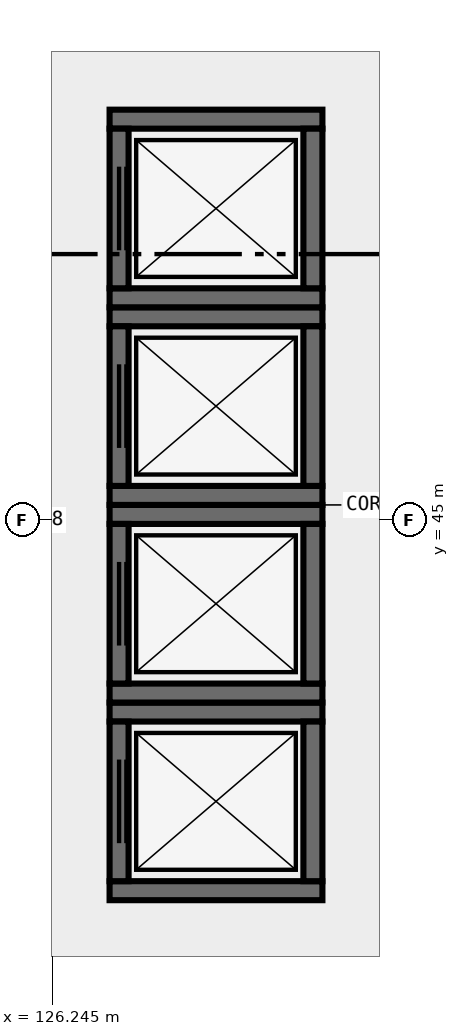
"""IFC4 building model, lengths in metres.
Left out: names, types, materials, properties, quantities, classifications, styles, units other than length and angle.
Written with IfcOpenShell. Run it as: python <this file> out.ifc"""

import sys

from ifc_helpers import new_model, si_unit, direction, frame, frame_2d, origin, place, context, subcontext, project, spatial, rectangle, extrude, element, fill, save


model = new_model("IFC4")
c1 = context("Model", 3, precision=1e-05, world=origin(), true_north=direction((0.0, 1.0)))
c2 = subcontext(c1, "Body", "Model", "MODEL_VIEW")
j1 = project(units=[si_unit("LENGTHUNIT", "METRE"), si_unit("PLANEANGLEUNIT", "RADIAN")], contexts=[c1])
p1 = place(None, origin())
s1 = spatial("IfcSite", under=j1, at=p1, CompositionType="ELEMENT")
p2 = place(p1, origin())
s2 = spatial("IfcBuilding", under=s1, at=p2, CompositionType="ELEMENT")
p3 = place(p2, origin())
s3 = spatial("IfcBuildingStorey", under=s2, at=p3, CompositionType="ELEMENT", Elevation=0.0)
for number, where, z_axis, x_axis in (
    (1, (127.0, 40.125, 0.0), (0.0, 0.0, 1.0), (1.0, 0.0, 0.0)),
    (2, (129.8, 42.475, 0.0), (0.0, 0.0, 1.0), (-1.0, 0.0, 0.0)),
):
    element("IfcWall", number, at=place(p3, frame(where, z_axis=z_axis, x_axis=x_axis)), inside=s3, PredefinedType="SHEAR", context=c2, shape_type="SweptSolid", body=[
        extrude(rectangle(XDim=2.8, YDim=0.25, at=frame_2d((1.4, 0.0))), origin(), (0.0, 0.0, 1.0), 6.0),
    ])
p4 = place(p3, frame((127.125, 42.35, 0.0), z_axis=(0.0, 0.0, 1.0), x_axis=(0.0, -1.0, 0.0)))
e3 = element("IfcWall", 3, at=p4, inside=s3, PredefinedType="SHEAR", context=c2, shape_type="SweptSolid", body=[
    extrude(rectangle(XDim=2.1, YDim=0.25, at=frame_2d((1.05, 0.0))), origin(), (0.0, 0.0, 1.0), 6.0),
])
p5 = place(p4, frame((0.5, 0.0, 0.0)))
e4 = element("IfcOpeningElement", 4, at=p5, cuts=e3, PredefinedType="OPENING", context=c2, shape_type="SweptSolid", body=[
    extrude(rectangle(XDim=1.1, YDim=2.2, at=frame_2d((0.55, 1.1))), frame((0.0, 0.14, 0.0), z_axis=(0.0, -1.0, 0.0), x_axis=(1.0, 0.0, 0.0)), (0.0, 0.0, 1.0), 0.28),
])
p6 = place(p3, frame((129.675, 40.25, 0.0), z_axis=(0.0, 0.0, 1.0), x_axis=(0.0, 1.0, 0.0)))
e5 = element("IfcWall", 5, at=p6, inside=s3, PredefinedType="SHEAR", context=c2, shape_type="SweptSolid", body=[
    extrude(rectangle(XDim=2.1, YDim=0.25, at=frame_2d((1.05, 0.0))), origin(), (0.0, 0.0, 1.0), 6.0),
])
for number, where, z_axis, x_axis in (
    (6, (127.0, 42.725, 0.0), (0.0, 0.0, 1.0), (1.0, 0.0, 0.0)),
    (7, (129.8, 45.075, 0.0), (0.0, 0.0, 1.0), (-1.0, 0.0, 0.0)),
):
    element("IfcWall", number, at=place(p3, frame(where, z_axis=z_axis, x_axis=x_axis)), inside=s3, PredefinedType="SHEAR", context=c2, shape_type="SweptSolid", body=[
        extrude(rectangle(XDim=2.8, YDim=0.25, at=frame_2d((1.4, 0.0))), origin(), (0.0, 0.0, 1.0), 6.0),
    ])
p7 = place(p3, frame((127.125, 44.95, 0.0), z_axis=(0.0, 0.0, 1.0), x_axis=(0.0, -1.0, 0.0)))
e8 = element("IfcWall", 8, at=p7, inside=s3, PredefinedType="SHEAR", context=c2, shape_type="SweptSolid", body=[
    extrude(rectangle(XDim=2.1, YDim=0.25, at=frame_2d((1.05, 0.0))), origin(), (0.0, 0.0, 1.0), 6.0),
])
p8 = place(p7, frame((0.5, 0.0, 0.0)))
e9 = element("IfcOpeningElement", 9, at=p8, cuts=e8, PredefinedType="OPENING", context=c2, shape_type="SweptSolid", body=[
    extrude(rectangle(XDim=1.1, YDim=2.2, at=frame_2d((0.55, 1.1))), frame((0.0, 0.14, 0.0), z_axis=(0.0, -1.0, 0.0), x_axis=(1.0, 0.0, 0.0)), (0.0, 0.0, 1.0), 0.28),
])
p9 = place(p3, frame((129.675, 42.85, 0.0), z_axis=(0.0, 0.0, 1.0), x_axis=(0.0, 1.0, 0.0)))
e10 = element("IfcWall", 10, at=p9, inside=s3, PredefinedType="SHEAR", context=c2, shape_type="SweptSolid", body=[
    extrude(rectangle(XDim=2.1, YDim=0.25, at=frame_2d((1.05, 0.0))), origin(), (0.0, 0.0, 1.0), 6.0),
])
for number, where, z_axis, x_axis in (
    (11, (127.0, 45.325, 0.0), (0.0, 0.0, 1.0), (1.0, 0.0, 0.0)),
    (12, (129.8, 47.675, 0.0), (0.0, 0.0, 1.0), (-1.0, 0.0, 0.0)),
):
    element("IfcWall", number, at=place(p3, frame(where, z_axis=z_axis, x_axis=x_axis)), inside=s3, PredefinedType="SHEAR", context=c2, shape_type="SweptSolid", body=[
        extrude(rectangle(XDim=2.8, YDim=0.25, at=frame_2d((1.4, 0.0))), origin(), (0.0, 0.0, 1.0), 6.0),
    ])
p10 = place(p3, frame((127.125, 47.55, 0.0), z_axis=(0.0, 0.0, 1.0), x_axis=(0.0, -1.0, 0.0)))
e13 = element("IfcWall", 13, at=p10, inside=s3, PredefinedType="SHEAR", context=c2, shape_type="SweptSolid", body=[
    extrude(rectangle(XDim=2.1, YDim=0.25, at=frame_2d((1.05, 0.0))), origin(), (0.0, 0.0, 1.0), 6.0),
])
p11 = place(p10, frame((0.5, 0.0, 0.0)))
e14 = element("IfcOpeningElement", 14, at=p11, cuts=e13, PredefinedType="OPENING", context=c2, shape_type="SweptSolid", body=[
    extrude(rectangle(XDim=1.1, YDim=2.2, at=frame_2d((0.55, 1.1))), frame((0.0, 0.14, 0.0), z_axis=(0.0, -1.0, 0.0), x_axis=(1.0, 0.0, 0.0)), (0.0, 0.0, 1.0), 0.28),
])
p12 = place(p3, frame((129.675, 45.45, 0.0), z_axis=(0.0, 0.0, 1.0), x_axis=(0.0, 1.0, 0.0)))
e15 = element("IfcWall", 15, at=p12, inside=s3, PredefinedType="SHEAR", context=c2, shape_type="SweptSolid", body=[
    extrude(rectangle(XDim=2.1, YDim=0.25, at=frame_2d((1.05, 0.0))), origin(), (0.0, 0.0, 1.0), 6.0),
])
for number, where, z_axis, x_axis in (
    (16, (127.0, 47.925, 0.0), (0.0, 0.0, 1.0), (1.0, 0.0, 0.0)),
    (17, (129.8, 50.275, 0.0), (0.0, 0.0, 1.0), (-1.0, 0.0, 0.0)),
):
    element("IfcWall", number, at=place(p3, frame(where, z_axis=z_axis, x_axis=x_axis)), inside=s3, PredefinedType="SHEAR", context=c2, shape_type="SweptSolid", body=[
        extrude(rectangle(XDim=2.8, YDim=0.25, at=frame_2d((1.4, 0.0))), origin(), (0.0, 0.0, 1.0), 6.0),
    ])
p13 = place(p3, frame((127.125, 50.15, 0.0), z_axis=(0.0, 0.0, 1.0), x_axis=(0.0, -1.0, 0.0)))
e18 = element("IfcWall", 18, at=p13, inside=s3, PredefinedType="SHEAR", context=c2, shape_type="SweptSolid", body=[
    extrude(rectangle(XDim=2.1, YDim=0.25, at=frame_2d((1.05, 0.0))), origin(), (0.0, 0.0, 1.0), 6.0),
])
p14 = place(p13, frame((0.5, 0.0, 0.0)))
e19 = element("IfcOpeningElement", 19, at=p14, cuts=e18, PredefinedType="OPENING", context=c2, shape_type="SweptSolid", body=[
    extrude(rectangle(XDim=1.1, YDim=2.2, at=frame_2d((0.55, 1.1))), frame((0.0, 0.14, 0.0), z_axis=(0.0, -1.0, 0.0), x_axis=(1.0, 0.0, 0.0)), (0.0, 0.0, 1.0), 0.28),
])
p15 = place(p3, frame((129.675, 48.05, 0.0), z_axis=(0.0, 0.0, 1.0), x_axis=(0.0, 1.0, 0.0)))
e20 = element("IfcWall", 20, at=p15, inside=s3, PredefinedType="SHEAR", context=c2, shape_type="SweptSolid", body=[
    extrude(rectangle(XDim=2.1, YDim=0.25, at=frame_2d((1.05, 0.0))), origin(), (0.0, 0.0, 1.0), 6.0),
])
p16 = place(p5, origin())
e21 = element("IfcDoor", 21, at=p16, inside=s3, OperationType="DOUBLE_DOOR_SLIDING", PredefinedType="DOOR", context=c2, shape_type="SweptSolid", body=[
    extrude(rectangle(XDim=1.1, YDim=2.2, at=frame_2d((0.55, 1.1))), frame((0.0, 0.025, 0.0), z_axis=(0.0, -1.0, 0.0), x_axis=(1.0, 0.0, 0.0)), (0.0, 0.0, 1.0), 0.05),
])
fill(e4, e21)
p17 = place(p8, origin())
e22 = element("IfcDoor", 22, at=p17, inside=s3, OperationType="DOUBLE_DOOR_SLIDING", PredefinedType="DOOR", context=c2, shape_type="SweptSolid", body=[
    extrude(rectangle(XDim=1.1, YDim=2.2, at=frame_2d((0.55, 1.1))), frame((0.0, 0.025, 0.0), z_axis=(0.0, -1.0, 0.0), x_axis=(1.0, 0.0, 0.0)), (0.0, 0.0, 1.0), 0.05),
])
fill(e9, e22)
p18 = place(p11, origin())
e23 = element("IfcDoor", 23, at=p18, inside=s3, OperationType="DOUBLE_DOOR_SLIDING", PredefinedType="DOOR", context=c2, shape_type="SweptSolid", body=[
    extrude(rectangle(XDim=1.1, YDim=2.2, at=frame_2d((0.55, 1.1))), frame((0.0, 0.025, 0.0), z_axis=(0.0, -1.0, 0.0), x_axis=(1.0, 0.0, 0.0)), (0.0, 0.0, 1.0), 0.05),
])
fill(e14, e23)
p19 = place(p14, origin())
e24 = element("IfcDoor", 24, at=p19, inside=s3, OperationType="DOUBLE_DOOR_SLIDING", PredefinedType="DOOR", context=c2, shape_type="SweptSolid", body=[
    extrude(rectangle(XDim=1.1, YDim=2.2, at=frame_2d((0.55, 1.1))), frame((0.0, 0.025, 0.0), z_axis=(0.0, -1.0, 0.0), x_axis=(1.0, 0.0, 0.0)), (0.0, 0.0, 1.0), 0.05),
])
fill(e19, e24)
save(model, sys.argv[1])
